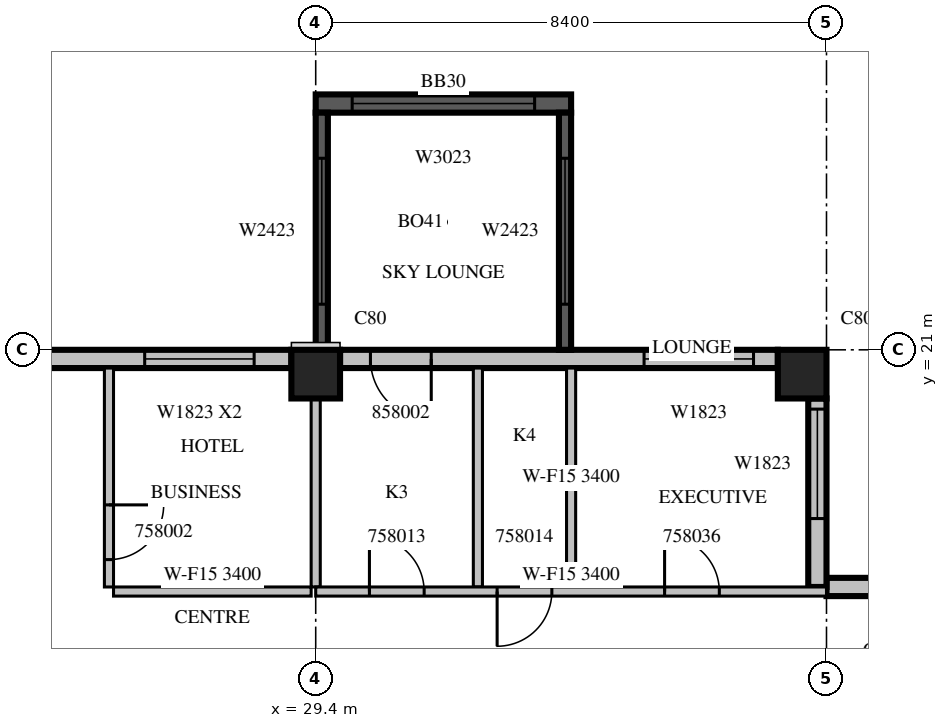
"""IFC4 building model, lengths in metres.
Left out: names, types, materials, properties, quantities, classifications, styles, units other than length and angle.
Written with IfcOpenShell. Run it as: python <this file> out.ifc"""

import sys

from ifc_helpers import new_model, si_unit, direction, frame, frame_2d, origin, origin_2d, place, context, subcontext, project, spatial, rectangle, extrude, source, transform, mapped, element, fill, save


model = new_model("IFC4")
c1 = context("Model", 3, precision=1e-05, world=origin(), true_north=direction((0.0, 1.0)))
c2 = subcontext(c1, "Body", "Model", "MODEL_VIEW")
j1 = project(units=[si_unit("LENGTHUNIT", "METRE"), si_unit("PLANEANGLEUNIT", "RADIAN")], contexts=[c1])
p1 = place(None, origin())
s1 = spatial("IfcSite", under=j1, at=p1, CompositionType="ELEMENT")
p2 = place(p1, origin())
s2 = spatial("IfcBuilding", under=s1, at=p2, CompositionType="ELEMENT")
p3 = place(p2, frame((0.0, 0.0, 253.8)))
s3 = spatial("IfcBuildingStorey", under=s2, at=p3, CompositionType="ELEMENT", Elevation=253.8)
m1 = source(origin(), c2, "Body", "SweptSolid", [
    extrude(rectangle(XDim=0.8, YDim=0.8, at=origin_2d()), origin(), (0.0, 0.0, 1.0), 3.8),
])
for number, where, z_axis, x_axis in (
    (1, (29.4, 20.6, 0.0), (0.0, 0.0, 1.0), (1.0, 0.0, 0.0)),
    (2, (37.4, 20.6, 0.0), (0.0, 0.0, 1.0), (1.0, 0.0, 0.0)),
):
    element("IfcColumn", number, at=place(p3, frame(where, z_axis=z_axis, x_axis=x_axis)), inside=s3, PredefinedType="COLUMN", context=c2, shape_type="MappedRepresentation", body=[
        mapped(m1, transform((0.0, 0.0, 0.0), scale=1.0)),
    ])
m2 = source(origin(), c2, "Body", "SweptSolid", [
    extrude(rectangle(XDim=15.96, YDim=0.3, at=frame_2d((7.98, 0.0))), origin(), (0.0, 0.0, 1.0), 3.4),
])
p4 = place(p3, frame((53.76, 17.1, 0.0), z_axis=(0.0, 0.0, 1.0), x_axis=(-1.0, 0.0, 0.0)))
e3 = element("IfcWall", 3, at=p4, inside=s3, PredefinedType="STANDARD", context=c2, shape_type="MappedRepresentation", body=[
    mapped(m2, transform((0.0, 0.0, 0.0), scale=1.0)),
])
m3 = source(origin(), c2, "Body", "SweptSolid", [
    extrude(rectangle(XDim=3.0, YDim=2.3, at=frame_2d((1.5, 1.15))), frame((0.0, 0.16, 0.0), z_axis=(0.0, -1.0, 0.0), x_axis=(1.0, 0.0, 0.0)), (0.0, 0.0, 1.0), 0.32),
])
p5 = place(p4, frame((0.6, 0.0, 0.6)))
e4 = element("IfcOpeningElement", 4, at=p5, cuts=e3, PredefinedType="OPENING", context=c2, shape_type="MappedRepresentation", body=[
    mapped(m3, transform((0.0, 0.0, 0.0), scale=1.0)),
])
p6 = place(p4, frame((4.8, 0.0, 0.6)))
e5 = element("IfcOpeningElement", 5, at=p6, cuts=e3, PredefinedType="OPENING", context=c2, shape_type="MappedRepresentation", body=[
    mapped(m3, transform((0.0, 0.0, 0.0), scale=1.0)),
])
m4 = source(origin(), c2, "Body", "SweptSolid", [
    extrude(rectangle(XDim=3.6, YDim=2.3, at=frame_2d((1.8, 1.15))), frame((0.0, 0.16, 0.0), z_axis=(0.0, -1.0, 0.0), x_axis=(1.0, 0.0, 0.0)), (0.0, 0.0, 1.0), 0.32),
])
p7 = place(p4, frame((9.54, 0.0, 0.6)))
e6 = element("IfcOpeningElement", 6, at=p7, cuts=e3, PredefinedType="OPENING", context=c2, shape_type="MappedRepresentation", body=[
    mapped(m4, transform((0.0, 0.0, 0.0), scale=1.0)),
])
m5 = source(origin(), c2, "Body", "SweptSolid", [
    extrude(rectangle(XDim=3.1, YDim=0.3, at=frame_2d((1.55, 0.0))), origin(), (0.0, 0.0, 1.0), 3.4),
])
p8 = place(p3, frame((37.65, 17.1, 0.0), z_axis=(0.0, 0.0, 1.0), x_axis=(0.0, 1.0, 0.0)))
e7 = element("IfcWall", 7, at=p8, inside=s3, PredefinedType="STANDARD", context=c2, shape_type="MappedRepresentation", body=[
    mapped(m5, transform((0.0, 0.0, 0.0), scale=1.0)),
])
m6 = source(origin(), c2, "Body", "SweptSolid", [
    extrude(rectangle(XDim=1.8, YDim=2.3, at=frame_2d((0.9, 1.15))), frame((0.0, 0.16, 0.0), z_axis=(0.0, -1.0, 0.0), x_axis=(1.0, 0.0, 0.0)), (0.0, 0.0, 1.0), 0.32),
])
p9 = place(p8, frame((1.125, 0.0, 0.6)))
e8 = element("IfcOpeningElement", 8, at=p9, cuts=e7, PredefinedType="OPENING", context=c2, shape_type="MappedRepresentation", body=[
    mapped(m6, transform((0.0, 0.0, 0.0), scale=1.0)),
])
m7 = source(origin(), c2, "Body", "SweptSolid", [
    extrude(rectangle(XDim=7.2, YDim=0.3, at=frame_2d((3.6, 0.0))), origin(), (0.0, 0.0, 1.0), 3.4),
])
p10 = place(p3, frame((37.0, 20.85, 0.0), z_axis=(0.0, 0.0, 1.0), x_axis=(-1.0, 0.0, 0.0)))
e9 = element("IfcWall", 9, at=p10, inside=s3, PredefinedType="STANDARD", context=c2, shape_type="MappedRepresentation", body=[
    mapped(m7, transform((0.0, 0.0, 0.0), scale=1.0)),
])
p11 = place(p10, frame((0.4, 0.0, 0.6)))
e10 = element("IfcOpeningElement", 10, at=p11, cuts=e9, PredefinedType="OPENING", context=c2, shape_type="MappedRepresentation", body=[
    mapped(m6, transform((0.0, 0.0, 0.0), scale=1.0)),
])
m8 = source(origin(), c2, "Body", "SweptSolid", [
    extrude(rectangle(XDim=1.0, YDim=2.1, at=frame_2d((0.5, 1.05))), frame((0.0, 0.16, 0.0), z_axis=(0.0, -1.0, 0.0), x_axis=(1.0, 0.0, 0.0)), (0.0, 0.0, 1.0), 0.32),
])
p12 = place(p10, frame((5.7, 0.0, 0.0)))
e11 = element("IfcOpeningElement", 11, at=p12, cuts=e9, PredefinedType="OPENING", context=c2, shape_type="MappedRepresentation", body=[
    mapped(m8, transform((0.0, 0.0, 0.0), scale=1.0)),
])
p13 = place(p3, frame((29.0, 20.85, 0.0), z_axis=(0.0, 0.0, 1.0), x_axis=(-1.0, 0.0, 0.0)))
e12 = element("IfcWall", 12, at=p13, inside=s3, PredefinedType="STANDARD", context=c2, shape_type="MappedRepresentation", body=[
    mapped(m7, transform((0.0, 0.0, 0.0), scale=1.0)),
])
p14 = place(p13, frame((0.613, 0.0, 0.6)))
e13 = element("IfcOpeningElement", 13, at=p14, cuts=e12, PredefinedType="OPENING", context=c2, shape_type="MappedRepresentation", body=[
    mapped(m6, transform((0.0, 0.0, 0.0), scale=1.0)),
])
p15 = place(p13, frame((5.0, 0.0, 0.6)))
e14 = element("IfcOpeningElement", 14, at=p15, cuts=e12, PredefinedType="OPENING", context=c2, shape_type="MappedRepresentation", body=[
    mapped(m6, transform((0.0, 0.0, 0.0), scale=1.0)),
])
m9 = source(origin(), c2, "Body", "SweptSolid", [
    extrude(rectangle(XDim=4.2, YDim=0.3, at=frame_2d((2.1, 0.0))), origin(), (0.0, 0.0, 1.0), 3.39),
])
p16 = place(p3, frame((33.6, 25.05, 0.0), z_axis=(0.0, 0.0, 1.0), x_axis=(-1.0, 0.0, 0.0)))
e15 = element("IfcWall", 15, at=p16, inside=s3, PredefinedType="SOLIDWALL", context=c2, shape_type="MappedRepresentation", body=[
    mapped(m9, transform((0.0, 0.0, 0.0), scale=1.0)),
])
p17 = place(p16, frame((0.6, 0.0, 0.6)))
e16 = element("IfcOpeningElement", 16, at=p17, cuts=e15, PredefinedType="OPENING", context=c2, shape_type="MappedRepresentation", body=[
    mapped(m3, transform((0.0, 0.0, 0.0), scale=1.0)),
])
m10 = source(origin(), c2, "Body", "SweptSolid", [
    extrude(rectangle(XDim=3.9, YDim=0.2, at=frame_2d((1.95, 0.0))), origin(), (0.0, 0.0, 1.0), 3.39),
])
p18 = place(p3, frame((33.5, 21.0, 0.0), z_axis=(0.0, 0.0, 1.0), x_axis=(0.0, 1.0, 0.0)))
e17 = element("IfcWall", 17, at=p18, inside=s3, PredefinedType="SOLIDWALL", context=c2, shape_type="MappedRepresentation", body=[
    mapped(m10, transform((0.0, 0.0, 0.0), scale=1.0)),
])
m11 = source(origin(), c2, "Body", "SweptSolid", [
    extrude(rectangle(XDim=2.4, YDim=2.3, at=frame_2d((1.2, 1.15))), frame((0.0, 0.11, 0.0), z_axis=(0.0, -1.0, 0.0), x_axis=(1.0, 0.0, 0.0)), (0.0, 0.0, 1.0), 0.22),
])
p19 = place(p18, frame((0.75, 0.0, 0.6)))
e18 = element("IfcOpeningElement", 18, at=p19, cuts=e17, PredefinedType="OPENING", context=c2, shape_type="MappedRepresentation", body=[
    mapped(m11, transform((0.0, 0.0, 0.0), scale=1.0)),
])
p20 = place(p3, frame((29.5, 21.0, 0.0), z_axis=(0.0, 0.0, 1.0), x_axis=(0.0, 1.0, 0.0)))
e19 = element("IfcWall", 19, at=p20, inside=s3, PredefinedType="SOLIDWALL", context=c2, shape_type="MappedRepresentation", body=[
    mapped(m10, transform((0.0, 0.0, 0.0), scale=1.0)),
])
p21 = place(p20, frame((0.75, 0.0, 0.6)))
e20 = element("IfcOpeningElement", 20, at=p21, cuts=e19, PredefinedType="OPENING", context=c2, shape_type="MappedRepresentation", body=[
    mapped(m11, transform((0.0, 0.0, 0.0), scale=1.0)),
])
m12 = source(origin(), c2, "Body", "SweptSolid", [
    extrude(rectangle(XDim=3.6, YDim=0.15, at=frame_2d((1.8, 0.0))), origin(), (0.0, 0.0, 1.0), 3.4),
])
p22 = place(p3, frame((26.0, 20.7, 0.0), z_axis=(0.0, 0.0, 1.0), x_axis=(0.0, -1.0, 0.0)))
e21 = element("IfcWall", 21, at=p22, inside=s3, PredefinedType="PARTITIONING", context=c2, shape_type="MappedRepresentation", body=[
    mapped(m12, transform((0.0, 0.0, 0.0), scale=1.0)),
])
m13 = source(origin(), c2, "Body", "SweptSolid", [
    extrude(rectangle(XDim=0.9, YDim=2.1, at=frame_2d((0.45, 1.05))), frame((0.0, 0.085, 0.0), z_axis=(0.0, -1.0, 0.0), x_axis=(1.0, 0.0, 0.0)), (0.0, 0.0, 1.0), 0.17),
])
p23 = place(p22, frame((2.25, 0.0, 0.0)))
e22 = element("IfcOpeningElement", 22, at=p23, cuts=e21, PredefinedType="OPENING", context=c2, shape_type="MappedRepresentation", body=[
    mapped(m13, transform((0.0, 0.0, 0.0), scale=1.0)),
])
m14 = source(origin(), c2, "Body", "SweptSolid", [
    extrude(rectangle(XDim=3.25, YDim=0.15, at=frame_2d((1.625, 0.0))), origin(), (0.0, 0.0, 1.0), 3.4),
])
p24 = place(p3, frame((26.075, 17.025, 0.0), z_axis=(0.0, 0.0, 1.0), x_axis=(1.0, 0.0, 0.0)))
e23 = element("IfcWall", 23, at=p24, inside=s3, PredefinedType="PARTITIONING", context=c2, shape_type="MappedRepresentation", body=[
    mapped(m14, transform((0.0, 0.0, 0.0), scale=1.0)),
])
m15 = source(origin(), c2, "Body", "SweptSolid", [
    extrude(rectangle(XDim=3.101, YDim=0.15, at=frame_2d((1.55, 0.0))), origin(), (0.0, 0.0, 1.0), 3.4),
])
p25 = place(p3, frame((29.4, 17.1, 0.0), z_axis=(0.0, 0.0, 1.0), x_axis=(0.0, 1.0, 0.0)))
e24 = element("IfcWall", 24, at=p25, inside=s3, PredefinedType="PARTITIONING", context=c2, shape_type="MappedRepresentation", body=[
    mapped(m15, transform((0.0, 0.0, 0.0), scale=1.0)),
])
for number, where, z_axis, x_axis in (
    (25, (32.067, 20.7, 0.0), (0.0, 0.0, 1.0), (0.0, -1.0, 0.0)),
    (26, (33.6, 17.1, 0.0), (0.0, 0.0, 1.0), (0.0, 1.0, 0.0)),
):
    element("IfcWall", number, at=place(p3, frame(where, z_axis=z_axis, x_axis=x_axis)), inside=s3, PredefinedType="PARTITIONING", context=c2, shape_type="MappedRepresentation", body=[
        mapped(m12, transform((0.0, 0.0, 0.0), scale=1.0)),
    ])
m16 = source(origin(), c2, "Body", "SweptSolid", [
    extrude(rectangle(XDim=8.4, YDim=0.15, at=frame_2d((4.2, 0.0))), origin(), (0.0, 0.0, 1.0), 3.4),
])
p26 = place(p3, frame((29.4, 17.025, 0.0), z_axis=(0.0, 0.0, 1.0), x_axis=(1.0, 0.0, 0.0)))
e27 = element("IfcWall", 27, at=p26, inside=s3, PredefinedType="PARTITIONING", context=c2, shape_type="MappedRepresentation", body=[
    mapped(m16, transform((0.0, 0.0, 0.0), scale=1.0)),
])
p27 = place(p26, frame((0.883, 0.0, 0.0)))
e28 = element("IfcOpeningElement", 28, at=p27, cuts=e27, PredefinedType="OPENING", context=c2, shape_type="MappedRepresentation", body=[
    mapped(m13, transform((0.0, 0.0, 0.0), scale=1.0)),
])
p28 = place(p26, frame((2.983, 0.0, 0.0)))
e29 = element("IfcOpeningElement", 29, at=p28, cuts=e27, PredefinedType="OPENING", context=c2, shape_type="MappedRepresentation", body=[
    mapped(m13, transform((0.0, 0.0, 0.0), scale=1.0)),
])
p29 = place(p26, frame((5.737, 0.0, 0.0)))
e30 = element("IfcOpeningElement", 30, at=p29, cuts=e27, PredefinedType="OPENING", context=c2, shape_type="MappedRepresentation", body=[
    mapped(m13, transform((0.0, 0.0, 0.0), scale=1.0)),
])
m17 = source(origin(), c2, "Body", "SweptSolid", [
    extrude(rectangle(XDim=1.8, YDim=2.3, at=frame_2d((0.9, 1.15))), frame((0.0, 0.03, 0.0), z_axis=(0.0, -1.0, 0.0), x_axis=(1.0, 0.0, 0.0)), (0.0, 0.0, 1.0), 0.06),
])
p30 = place(p9, origin())
e31 = element("IfcWindow", 31, at=p30, inside=s3, PartitioningType="SINGLE_PANEL", PredefinedType="WINDOW", context=c2, shape_type="MappedRepresentation", body=[
    mapped(m17, transform((0.0, 0.0, 0.0), scale=1.0)),
])
fill(e8, e31)
p31 = place(p11, origin())
e32 = element("IfcWindow", 32, at=p31, inside=s3, PartitioningType="SINGLE_PANEL", PredefinedType="WINDOW", context=c2, shape_type="MappedRepresentation", body=[
    mapped(m17, transform((0.0, 0.0, 0.0), scale=1.0)),
])
fill(e10, e32)
p32 = place(p14, origin())
e33 = element("IfcWindow", 33, at=p32, inside=s3, PartitioningType="SINGLE_PANEL", PredefinedType="WINDOW", context=c2, shape_type="MappedRepresentation", body=[
    mapped(m17, transform((0.0, 0.0, 0.0), scale=1.0)),
])
fill(e13, e33)
m18 = source(origin(), c2, "Body", "SweptSolid", [
    extrude(rectangle(XDim=3.0, YDim=2.3, at=frame_2d((1.5, 1.15))), frame((0.0, 0.03, 0.0), z_axis=(0.0, -1.0, 0.0), x_axis=(1.0, 0.0, 0.0)), (0.0, 0.0, 1.0), 0.06),
])
p33 = place(p17, origin())
e34 = element("IfcWindow", 34, at=p33, inside=s3, PartitioningType="SINGLE_PANEL", PredefinedType="WINDOW", context=c2, shape_type="MappedRepresentation", body=[
    mapped(m18, transform((0.0, 0.0, 0.0), scale=1.0)),
])
fill(e16, e34)
m19 = source(origin(), c2, "Body", "SweptSolid", [
    extrude(rectangle(XDim=2.4, YDim=2.3, at=frame_2d((1.2, 1.15))), frame((0.0, 0.03, 0.0), z_axis=(0.0, -1.0, 0.0), x_axis=(1.0, 0.0, 0.0)), (0.0, 0.0, 1.0), 0.06),
])
p34 = place(p19, origin())
e35 = element("IfcWindow", 35, at=p34, inside=s3, PartitioningType="SINGLE_PANEL", PredefinedType="WINDOW", context=c2, shape_type="MappedRepresentation", body=[
    mapped(m19, transform((0.0, 0.0, 0.0), scale=1.0)),
])
fill(e18, e35)
p35 = place(p21, origin())
e36 = element("IfcWindow", 36, at=p35, inside=s3, PartitioningType="SINGLE_PANEL", PredefinedType="WINDOW", context=c2, shape_type="MappedRepresentation", body=[
    mapped(m19, transform((0.0, 0.0, 0.0), scale=1.0)),
])
fill(e20, e36)
m20 = source(origin(), c2, "Body", "SweptSolid", [
    extrude(rectangle(XDim=0.9, YDim=2.1, at=frame_2d((0.45, 1.05))), frame((0.0, 0.025, 0.0), z_axis=(0.0, -1.0, 0.0), x_axis=(1.0, 0.0, 0.0)), (0.0, 0.0, 1.0), 0.05),
])
p36 = place(p23, origin())
e37 = element("IfcDoor", 37, at=p36, inside=s3, OperationType="SINGLE_SWING_LEFT", PredefinedType="DOOR", context=c2, shape_type="MappedRepresentation", body=[
    mapped(m20, transform((0.0, 0.0, 0.0), scale=1.0)),
])
fill(e22, e37)
p37 = place(p27, origin())
e38 = element("IfcDoor", 38, at=p37, inside=s3, OperationType="SINGLE_SWING_LEFT", PredefinedType="DOOR", context=c2, shape_type="MappedRepresentation", body=[
    mapped(m20, transform((0.0, 0.0, 0.0), scale=1.0)),
])
fill(e28, e38)
p38 = place(p28, origin())
e39 = element("IfcDoor", 39, at=p38, inside=s3, OperationType="SINGLE_SWING_RIGHT", PredefinedType="DOOR", context=c2, shape_type="MappedRepresentation", body=[
    mapped(m20, transform((0.0, 0.0, 0.0), scale=1.0)),
])
fill(e29, e39)
p39 = place(p29, origin())
e40 = element("IfcDoor", 40, at=p39, inside=s3, OperationType="SINGLE_SWING_LEFT", PredefinedType="DOOR", context=c2, shape_type="MappedRepresentation", body=[
    mapped(m20, transform((0.0, 0.0, 0.0), scale=1.0)),
])
fill(e30, e40)
m21 = source(origin(), c2, "Body", "SweptSolid", [
    extrude(rectangle(XDim=1.0, YDim=2.1, at=frame_2d((0.5, 1.05))), frame((0.0, 0.025, 0.0), z_axis=(0.0, -1.0, 0.0), x_axis=(1.0, 0.0, 0.0)), (0.0, 0.0, 1.0), 0.05),
])
p40 = place(p12, origin())
e41 = element("IfcDoor", 41, at=p40, inside=s3, OperationType="SINGLE_SWING_LEFT", PredefinedType="DOOR", context=c2, shape_type="MappedRepresentation", body=[
    mapped(m21, transform((0.0, 0.0, 0.0), scale=1.0)),
])
fill(e11, e41)
save(model, sys.argv[1])
